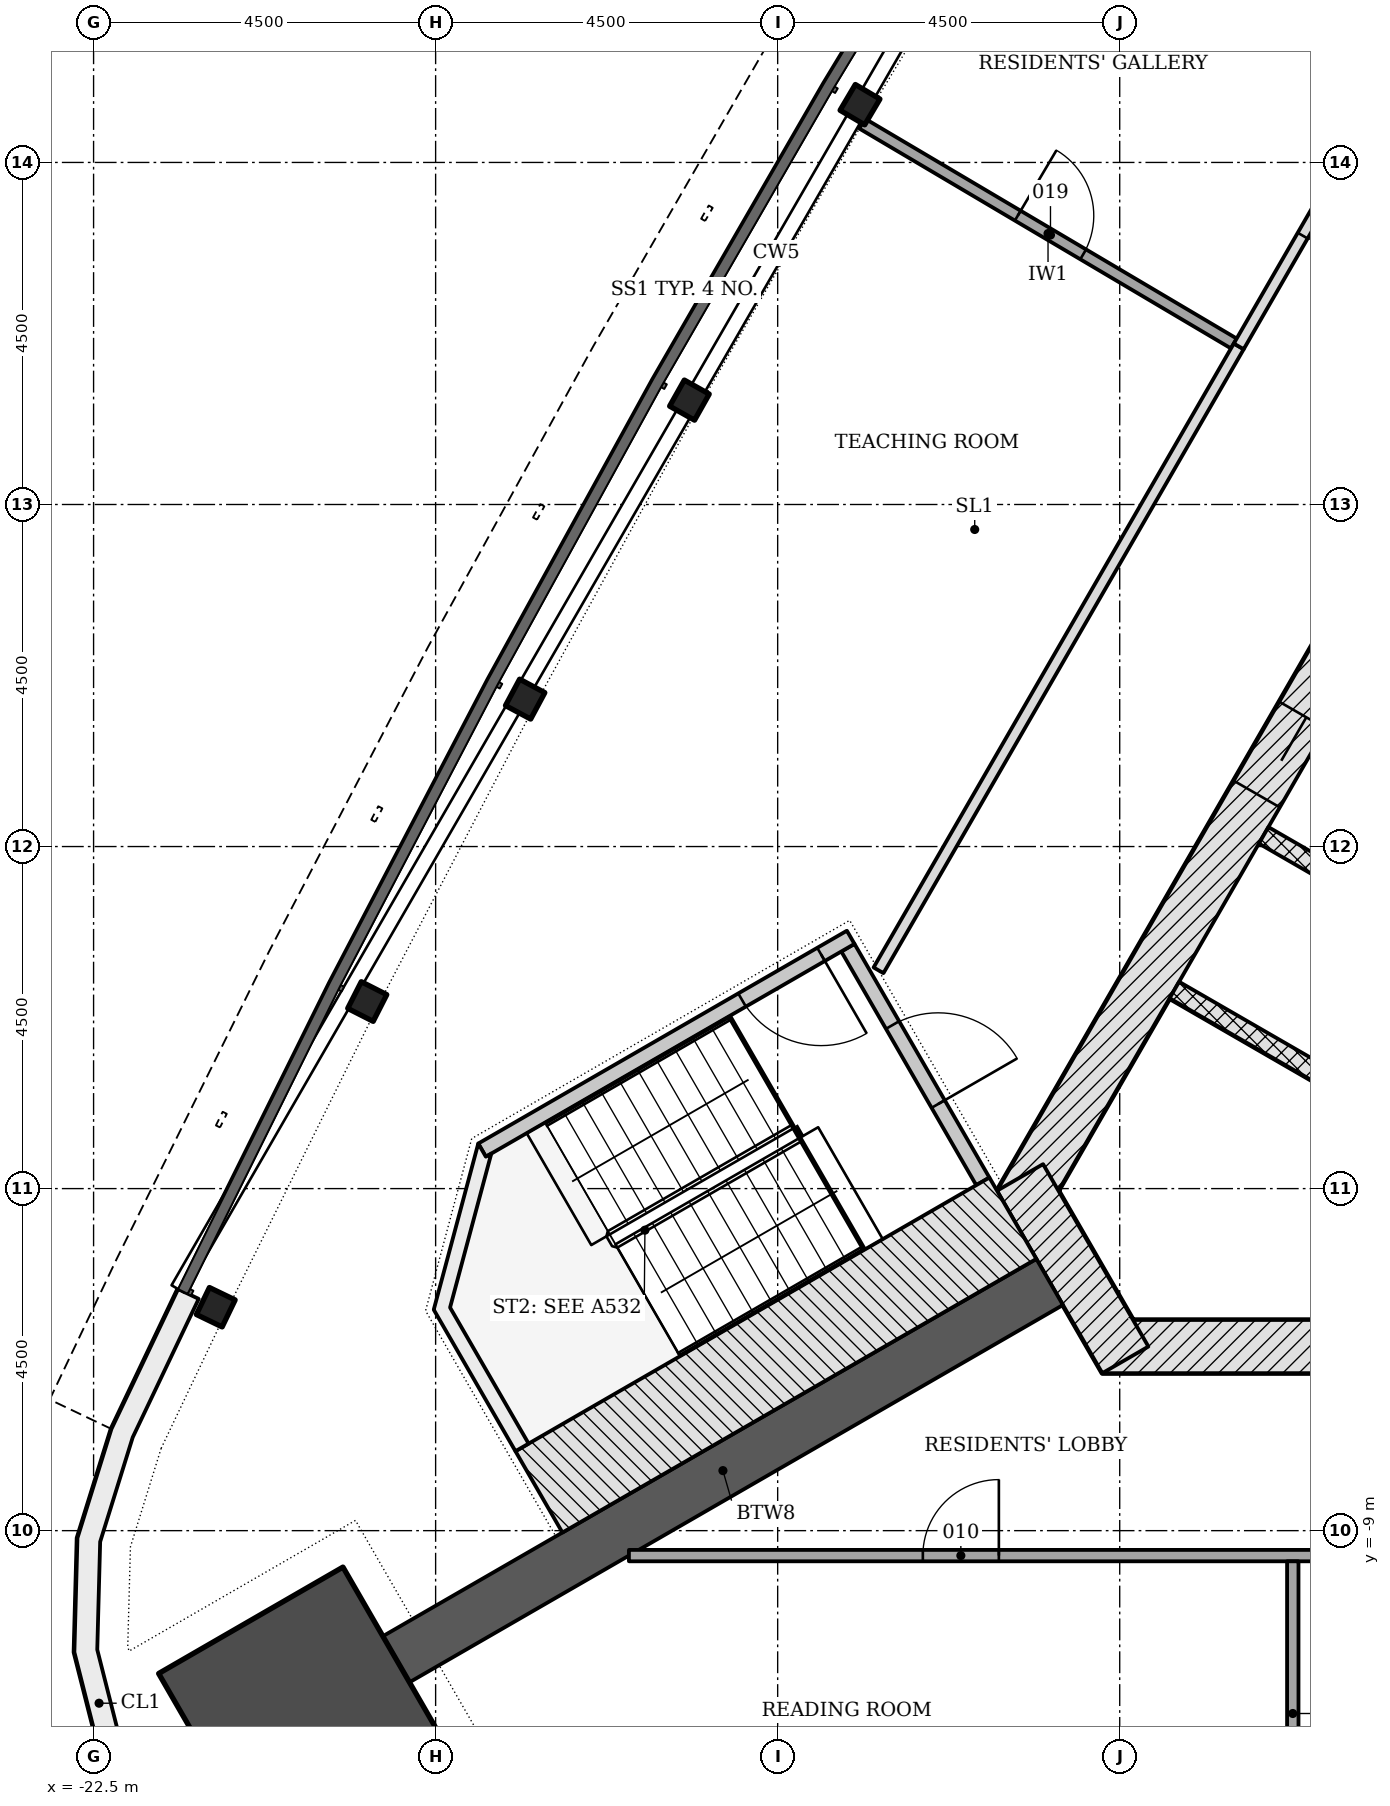
"""IFC4 building model, lengths in metres.
Left out: names, types, materials, properties, quantities, classifications, styles, units other than length and angle.
Written with IfcOpenShell. Run it as: python <this file> out.ifc"""

import sys

from ifc_helpers import new_model, si_unit, direction, frame, frame_2d, origin, origin_2d, place, context, subcontext, project, spatial, polyline, rectangle, i_section, outline, extrude, element, fill, save


model = new_model("IFC4")
c1 = context("Model", 3, precision=1e-05, world=origin(), true_north=direction((0.0, 1.0)))
c2 = subcontext(c1, "Body", "Model", "MODEL_VIEW")
j1 = project(units=[si_unit("LENGTHUNIT", "METRE"), si_unit("PLANEANGLEUNIT", "RADIAN")], contexts=[c1])
p1 = place(None, origin())
s1 = spatial("IfcSite", under=j1, at=p1, CompositionType="ELEMENT")
p2 = place(p1, origin())
s2 = spatial("IfcBuilding", under=s1, at=p2, CompositionType="ELEMENT")
p3 = place(p2, frame((0.0, 0.0, 174.3)))
s3 = spatial("IfcBuildingStorey", under=s2, at=p3, CompositionType="ELEMENT", Elevation=174.3)
p4 = place(p3, frame((-9.229, -6.578, -0.2), z_axis=(0.0, 0.0, 1.0), x_axis=(1.0, 0.0, 0.0)))
e1 = element("IfcWall", 1, at=p4, inside=s3, PredefinedType="SHEAR", context=c2, shape_type="SweptSolid", body=[
    extrude(rectangle(XDim=18.458, YDim=0.7, at=frame_2d((9.229, 0.0))), origin(), (0.0, 0.0, 1.0), 3.6),
])
p5 = place(p4, frame((7.5, 0.0, 0.2)))
e2 = element("IfcOpeningElement", 2, at=p5, cuts=e1, PredefinedType="OPENING", context=c2, shape_type="SweptSolid", body=[
    extrude(rectangle(XDim=1.0, YDim=2.1, at=frame_2d((0.5, 1.05))), frame((0.0, 0.36, 0.0), z_axis=(0.0, -1.0, 0.0), x_axis=(1.0, 0.0, 0.0)), (0.0, 0.0, 1.0), 0.72),
])
p6 = place(p4, frame((3.389, 0.0, 0.2)))
e3 = element("IfcOpeningElement", 3, at=p6, cuts=e1, PredefinedType="OPENING", context=c2, shape_type="SweptSolid", body=[
    extrude(rectangle(XDim=0.9, YDim=2.1, at=frame_2d((0.45, 1.05))), frame((0.0, 0.36, 0.0), z_axis=(0.0, -1.0, 0.0), x_axis=(1.0, 0.0, 0.0)), (0.0, 0.0, 1.0), 0.72),
])
p7 = place(p4, frame((10.363, 0.0, 0.2)))
e4 = element("IfcOpeningElement", 4, at=p7, cuts=e1, PredefinedType="OPENING", context=c2, shape_type="SweptSolid", body=[
    extrude(rectangle(XDim=1.0, YDim=2.1, at=frame_2d((0.5, 1.05))), frame((0.0, 0.36, 0.0), z_axis=(0.0, -1.0, 0.0), x_axis=(1.0, 0.0, 0.0)), (0.0, 0.0, 1.0), 0.72),
])
p8 = place(p4, frame((15.077, 0.0, 0.2)))
e5 = element("IfcOpeningElement", 5, at=p8, cuts=e1, PredefinedType="OPENING", context=c2, shape_type="SweptSolid", body=[
    extrude(rectangle(XDim=0.9, YDim=2.1, at=frame_2d((0.45, 1.05))), frame((0.0, 0.36, 0.0), z_axis=(0.0, -1.0, 0.0), x_axis=(1.0, 0.0, 0.0)), (0.0, 0.0, 1.0), 0.72),
])
p9 = place(p3, frame((-1.083, 11.281, -0.2), z_axis=(0.0, 0.0, 1.0), x_axis=(-0.500001446645, -0.866024568562, 0.0)))
e6 = element("IfcWall", 6, at=p9, inside=s3, PredefinedType="SHEAR", context=c2, shape_type="SweptSolid", body=[
    extrude(rectangle(XDim=18.458, YDim=0.7, at=frame_2d((9.229, 0.0))), origin(), (0.0, 0.0, 1.0), 3.6),
])
p10 = place(p9, frame((8.979, 0.0, 0.2)))
e7 = element("IfcOpeningElement", 7, at=p10, cuts=e6, PredefinedType="OPENING", context=c2, shape_type="SweptSolid", body=[
    extrude(rectangle(XDim=1.2, YDim=2.1, at=frame_2d((0.6, 1.05))), frame((0.0, 0.36, 0.0), z_axis=(0.0, -1.0, 0.0), x_axis=(1.0, 0.0, 0.0)), (0.0, 0.0, 1.0), 0.72),
])
p11 = place(p9, frame((11.029, 0.0, 0.2)))
e8 = element("IfcOpeningElement", 8, at=p11, cuts=e6, PredefinedType="OPENING", context=c2, shape_type="SweptSolid", body=[
    extrude(rectangle(XDim=1.2, YDim=2.1, at=frame_2d((0.6, 1.05))), frame((0.0, 0.36, 0.0), z_axis=(0.0, -1.0, 0.0), x_axis=(1.0, 0.0, 0.0)), (0.0, 0.0, 1.0), 0.72),
])
p12 = place(p3, frame((-10.311, -4.353, -0.2), z_axis=(0.0, 0.0, 1.0), x_axis=(0.500042739161, -0.866000726912, 0.0)))
e9 = element("IfcWall", 9, at=p12, inside=s3, PredefinedType="SHEAR", context=c2, shape_type="SweptSolid", body=[
    extrude(rectangle(XDim=2.771, YDim=0.7, at=frame_2d((1.386, 0.0))), origin(), (0.0, 0.0, 1.0), 3.6),
])
p13 = place(p3, frame((-9.922, -5.728, -0.2), z_axis=(0.0, 0.0, 1.0), x_axis=(-0.866029553954, -0.499992811627, 0.0)))
e10 = element("IfcWall", 10, at=p13, inside=s3, PredefinedType="SHEAR", context=c2, shape_type="SweptSolid", body=[
    extrude(rectangle(XDim=9.927, YDim=0.7, at=frame_2d((4.964, 0.0))), origin(), (0.0, 0.0, 1.0), 3.6),
])
p14 = place(p3, frame((-19.731, -11.392, -0.2), z_axis=(0.0, 0.0, 1.0), x_axis=(-0.866025403784, -0.5, 0.0)))
e11 = element("IfcColumn", 11, at=p14, inside=s3, PredefinedType="COLUMN", context=c2, shape_type="SweptSolid", body=[
    extrude(rectangle(XDim=2.8, YDim=2.8, at=origin_2d()), origin(), (0.0, 0.0, 1.0), 3.6),
])
for number, where, z_axis, x_axis in (
    (12, (-12.417, 9.76, -0.2), (0.0, 0.0, 1.0), (-0.509, -0.861, 0.0)),
    (13, (-14.661, 5.873, -0.2), (0.0, 0.0, 1.0), (-0.491, -0.871, 0.0)),
    (14, (-16.822, 1.939, -0.2), (0.0, 0.0, 1.0), (-0.472, -0.881, 0.0)),
    (15, (-18.9, -2.039, -0.2), (0.0, 0.0, 1.0), (-0.453, -0.891, 0.0)),
    (16, (-20.893, -6.061, -0.2), (0.0, 0.0, 1.0), (-0.434, -0.901, 0.0)),
):
    element("IfcColumn", number, at=place(p3, frame(where, z_axis=z_axis, x_axis=x_axis)), inside=s3, PredefinedType="COLUMN", context=c2, shape_type="SweptSolid", body=[
        extrude(i_section(OverallWidth=0.394, OverallDepth=0.376, WebThickness=0.017, FlangeThickness=0.028, FilletRadius=0.015, at=origin_2d()), origin(), (0.0, 0.0, 1.0), 3.6),
    ])
p15 = place(p3, origin())
e17 = element("IfcWall", 17, at=p15, inside=s3, PredefinedType="NOTDEFINED", context=c2, shape_type="SweptSolid", body=[
    extrude(outline(polyline([(-21.388, -5.822), (-22.265, -7.662), (-22.712, -9.097), (-22.753, -10.599), (-22.383, -12.055), (-21.632, -13.357), (-20.555, -14.405), (-19.234, -15.121), (-17.768, -15.451), (-15.736, -15.612), (-15.712, -15.312), (-17.723, -15.154), (-19.128, -14.837), (-20.376, -14.161), (-21.393, -13.171), (-22.103, -11.941), (-22.452, -10.565), (-22.413, -9.146), (-21.985, -7.772), (-21.117, -5.951), (-21.388, -5.822)])), origin(), (0.0, 0.0, 1.0), 3.3),
])
for number, where, z_axis, x_axis in (
    (18, (-7.106, 0.148, -0.2), (0.0, 0.0, 1.0), (0.866, -0.5, 0.0)),
    (19, (-8.281, -1.887, -0.2), (0.0, 0.0, 1.0), (0.866, -0.5, 0.0)),
):
    element("IfcWall", number, at=place(p3, frame(where, z_axis=z_axis, x_axis=x_axis)), inside=s3, PredefinedType="PARTITIONING", context=c2, shape_type="SweptSolid", body=[
        extrude(rectangle(XDim=2.9, YDim=0.25, at=frame_2d((1.45, 0.0))), origin(), (0.0, 0.0, 1.0), 3.6),
    ])
p16 = place(p3, frame((-12.576, -1.331, -0.2), z_axis=(0.0, 0.0, 1.0), x_axis=(0.499970499736, -0.8660424351, 0.0)))
e20 = element("IfcWall", 20, at=p16, inside=s3, PredefinedType="SHEAR", context=c2, shape_type="SweptSolid", body=[
    extrude(rectangle(XDim=3.55, YDim=0.2, at=frame_2d((1.775, 0.0))), origin(), (0.0, 0.0, 1.0), 3.6),
])
p17 = place(p16, frame((1.175, 0.0, 0.2)))
e21 = element("IfcOpeningElement", 21, at=p17, cuts=e20, PredefinedType="OPENING", context=c2, shape_type="SweptSolid", body=[
    extrude(rectangle(XDim=1.2, YDim=2.1, at=frame_2d((0.6, 1.05))), frame((0.0, 0.11, 0.0), z_axis=(0.0, -1.0, 0.0), x_axis=(1.0, 0.0, 0.0)), (0.0, 0.0, 1.0), 0.22),
])
p18 = place(p3, frame((-12.539, -1.194, -0.2), z_axis=(0.0, 0.0, 1.0), x_axis=(-0.866045472092, -0.499965239061, 0.0)))
e22 = element("IfcWall", 22, at=p18, inside=s3, PredefinedType="SHEAR", context=c2, shape_type="SweptSolid", body=[
    extrude(rectangle(XDim=5.6, YDim=0.2, at=frame_2d((2.8, 0.0))), origin(), (0.0, 0.0, 1.0), 3.6),
])
p19 = place(p18, frame((0.45, 0.0, 0.2)))
e23 = element("IfcOpeningElement", 23, at=p19, cuts=e22, PredefinedType="OPENING", context=c2, shape_type="SweptSolid", body=[
    extrude(rectangle(XDim=1.2, YDim=2.1, at=frame_2d((0.6, 1.05))), frame((0.0, 0.11, 0.0), z_axis=(0.0, -1.0, 0.0), x_axis=(1.0, 0.0, 0.0)), (0.0, 0.0, 1.0), 0.22),
])
p20 = place(p3, frame((-10.406, -4.89, -0.2), z_axis=(0.0, 0.0, 1.0), x_axis=(-0.866018442252, -0.500012057535, 0.0)))
e24 = element("IfcWall", 24, at=p20, inside=s3, PredefinedType="SHEAR", context=c2, shape_type="SweptSolid", body=[
    extrude(rectangle(XDim=7.2, YDim=1.236, at=frame_2d((3.6, 0.0))), origin(), (0.0, 0.0, 1.0), 3.6),
])
p21 = place(p3, frame((0.0, 0.0, -0.2)))
e25 = element("IfcWall", 25, at=p21, inside=s3, PredefinedType="SHEAR", context=c2, shape_type="SweptSolid", body=[
    extrude(outline(polyline([(-17.439, -3.907), (-18.025, -6.093), (-16.95, -7.955), (-16.777, -7.855), (-17.81, -6.065), (-17.267, -4.039), (-17.339, -4.081), (-17.339, -4.081), (-17.339, -4.081), (-17.339, -4.081), (-17.339, -4.081), (-17.339, -4.081), (-17.339, -4.081), (-17.339, -4.081), (-17.339, -4.081), (-17.339, -4.081), (-17.339, -4.081), (-17.339, -4.081), (-17.339, -4.081), (-17.339, -4.081), (-17.339, -4.081), (-17.339, -4.081), (-17.339, -4.081), (-17.439, -3.907)])), origin(), (0.0, 0.0, 1.0), 3.6),
])
p22 = place(p3, frame((-15.457, -9.328, 0.0), z_axis=(0.0, 0.0, 1.0), x_axis=(1.0, 0.0, 0.0)))
e26 = element("IfcWall", 26, at=p22, inside=s3, PredefinedType="PARTITIONING", context=c2, shape_type="SweptSolid", body=[
    extrude(rectangle(XDim=9.123, YDim=0.15, at=frame_2d((4.562, 0.0))), origin(), (0.0, 0.0, 1.0), 2.847),
])
p23 = place(p22, frame((3.867, 0.0, 0.0)))
e27 = element("IfcOpeningElement", 27, at=p23, cuts=e26, PredefinedType="OPENING", context=c2, shape_type="SweptSolid", body=[
    extrude(rectangle(XDim=1.0, YDim=2.1, at=frame_2d((0.5, 1.05))), frame((0.0, 0.085, 0.0), z_axis=(0.0, -1.0, 0.0), x_axis=(1.0, 0.0, 0.0)), (0.0, 0.0, 1.0), 0.17),
])
p24 = place(p3, frame((-6.723, -9.403, 0.0), z_axis=(0.0, 0.0, 1.0), x_axis=(0.0, -1.0, 0.0)))
e28 = element("IfcWall", 28, at=p24, inside=s3, PredefinedType="PARTITIONING", context=c2, shape_type="SweptSolid", body=[
    extrude(rectangle(XDim=4.005, YDim=0.15, at=frame_2d((2.002, 0.0))), origin(), (0.0, 0.0, 1.0), 2.847),
])
p25 = place(p3, frame((-7.434, 6.58, 0.0), z_axis=(0.0, 0.0, 1.0), x_axis=(-0.499998195608, -0.866026445548, 0.0)))
e29 = element("IfcWall", 29, at=p25, inside=s3, PredefinedType="PARTITIONING", context=c2, shape_type="SweptSolid", body=[
    extrude(rectangle(XDim=9.478, YDim=0.15, at=frame_2d((4.739, 0.0))), origin(), (0.0, 0.0, 1.0), 2.847),
])
p26 = place(p3, frame((-10.067, 13.348, 0.0), z_axis=(0.0, 0.0, 1.0), x_axis=(0.84969615017, -0.527272654692, 0.0)))
e30 = element("IfcWall", 30, at=p26, inside=s3, PredefinedType="PARTITIONING", context=c2, shape_type="SweptSolid", body=[
    extrude(rectangle(XDim=5.592, YDim=0.15, at=frame_2d((2.796, 0.0))), origin(), (0.0, 0.0, 1.0), 3.4),
])
p27 = place(p26, frame((2.333, 0.0, 0.0)))
e31 = element("IfcOpeningElement", 31, at=p27, cuts=e30, PredefinedType="OPENING", context=c2, shape_type="SweptSolid", body=[
    extrude(rectangle(XDim=1.0, YDim=2.1, at=frame_2d((0.5, 1.05))), frame((0.0, 0.085, 0.0), z_axis=(0.0, -1.0, 0.0), x_axis=(1.0, 0.0, 0.0)), (0.0, 0.0, 1.0), 0.17),
])
p28 = place(p3, frame((-12.388, 9.51, 0.0), z_axis=(0.0, 0.0, 1.0), x_axis=(0.860691995407, -0.509126005073, 0.0)))
e32 = element("IfcWall", 32, at=p28, inside=s3, PredefinedType="PARTITIONING", context=c2, shape_type="SweptSolid", body=[
    extrude(rectangle(XDim=5.68, YDim=0.15, at=frame_2d((2.84, 0.0))), origin(), (0.0, 0.0, 1.0), 3.4),
])
p29 = place(p28, frame((2.378, 0.0, 0.0)))
e33 = element("IfcOpeningElement", 33, at=p29, cuts=e32, PredefinedType="OPENING", context=c2, shape_type="SweptSolid", body=[
    extrude(rectangle(XDim=1.0, YDim=2.1, at=frame_2d((0.5, 1.05))), frame((0.0, 0.085, 0.0), z_axis=(0.0, -1.0, 0.0), x_axis=(1.0, 0.0, 0.0)), (0.0, 0.0, 1.0), 0.17),
])
p30 = place(p3, frame((-5.251, 10.36, 0.0), z_axis=(0.0, 0.0, 1.0), x_axis=(-0.500012937857, -0.86601793398, 0.0)))
e34 = element("IfcWall", 34, at=p30, inside=s3, PredefinedType="PARTITIONING", context=c2, shape_type="SweptSolid", body=[
    extrude(rectangle(XDim=4.365, YDim=0.15, at=frame_2d((2.183, 0.0))), origin(), (0.0, 0.0, 1.0), 2.847),
])
p31 = place(p30, frame((1.683, 0.0, 0.0)))
e35 = element("IfcOpeningElement", 35, at=p31, cuts=e34, PredefinedType="OPENING", context=c2, shape_type="SweptSolid", body=[
    extrude(rectangle(XDim=1.0, YDim=2.1, at=frame_2d((0.5, 1.05))), frame((0.0, 0.085, 0.0), z_axis=(0.0, -1.0, 0.0), x_axis=(1.0, 0.0, 0.0)), (0.0, 0.0, 1.0), 0.17),
])
p32 = place(p11, origin())
e36 = element("IfcDoor", 36, at=p32, inside=s3, OperationType="DOUBLE_DOOR_SLIDING", PredefinedType="DOOR", context=c2, shape_type="SweptSolid", body=[
    extrude(rectangle(XDim=1.2, YDim=2.1, at=frame_2d((0.6, 1.05))), frame((0.0, 0.025, 0.0), z_axis=(0.0, -1.0, 0.0), x_axis=(1.0, 0.0, 0.0)), (0.0, 0.0, 1.0), 0.05),
])
fill(e8, e36)
p33 = place(p17, origin())
e37 = element("IfcDoor", 37, at=p33, inside=s3, OperationType="SINGLE_SWING_RIGHT", PredefinedType="DOOR", context=c2, shape_type="SweptSolid", body=[
    extrude(rectangle(XDim=1.2, YDim=2.1, at=frame_2d((0.6, 1.05))), frame((0.0, 0.025, 0.0), z_axis=(0.0, -1.0, 0.0), x_axis=(1.0, 0.0, 0.0)), (0.0, 0.0, 1.0), 0.05),
])
fill(e21, e37)
p34 = place(p19, origin())
e38 = element("IfcDoor", 38, at=p34, inside=s3, OperationType="SINGLE_SWING_LEFT", PredefinedType="DOOR", context=c2, shape_type="SweptSolid", body=[
    extrude(rectangle(XDim=1.2, YDim=2.1, at=frame_2d((0.6, 1.05))), frame((0.0, 0.025, 0.0), z_axis=(0.0, -1.0, 0.0), x_axis=(1.0, 0.0, 0.0)), (0.0, 0.0, 1.0), 0.05),
])
fill(e23, e38)
p35 = place(p23, origin())
e39 = element("IfcDoor", 39, at=p35, inside=s3, OperationType="SINGLE_SWING_RIGHT", PredefinedType="DOOR", context=c2, shape_type="SweptSolid", body=[
    extrude(rectangle(XDim=1.0, YDim=2.1, at=frame_2d((0.5, 1.05))), frame((0.0, 0.025, 0.0), z_axis=(0.0, -1.0, 0.0), x_axis=(1.0, 0.0, 0.0)), (0.0, 0.0, 1.0), 0.05),
])
fill(e27, e39)
p36 = place(p31, origin())
e40 = element("IfcDoor", 40, at=p36, inside=s3, OperationType="SINGLE_SWING_LEFT", PredefinedType="DOOR", context=c2, shape_type="SweptSolid", body=[
    extrude(rectangle(XDim=1.0, YDim=2.1, at=frame_2d((0.5, 1.05))), frame((0.0, 0.025, 0.0), z_axis=(0.0, -1.0, 0.0), x_axis=(1.0, 0.0, 0.0)), (0.0, 0.0, 1.0), 0.05),
])
fill(e35, e40)
p37 = place(p29, origin())
e41 = element("IfcDoor", 41, at=p37, inside=s3, OperationType="SINGLE_SWING_LEFT", PredefinedType="DOOR", context=c2, shape_type="SweptSolid", body=[
    extrude(rectangle(XDim=1.0, YDim=2.1, at=frame_2d((0.5, 1.05))), frame((0.0, 0.025, 0.0), z_axis=(0.0, -1.0, 0.0), x_axis=(1.0, 0.0, 0.0)), (0.0, 0.0, 1.0), 0.05),
])
fill(e33, e41)
save(model, sys.argv[1])
